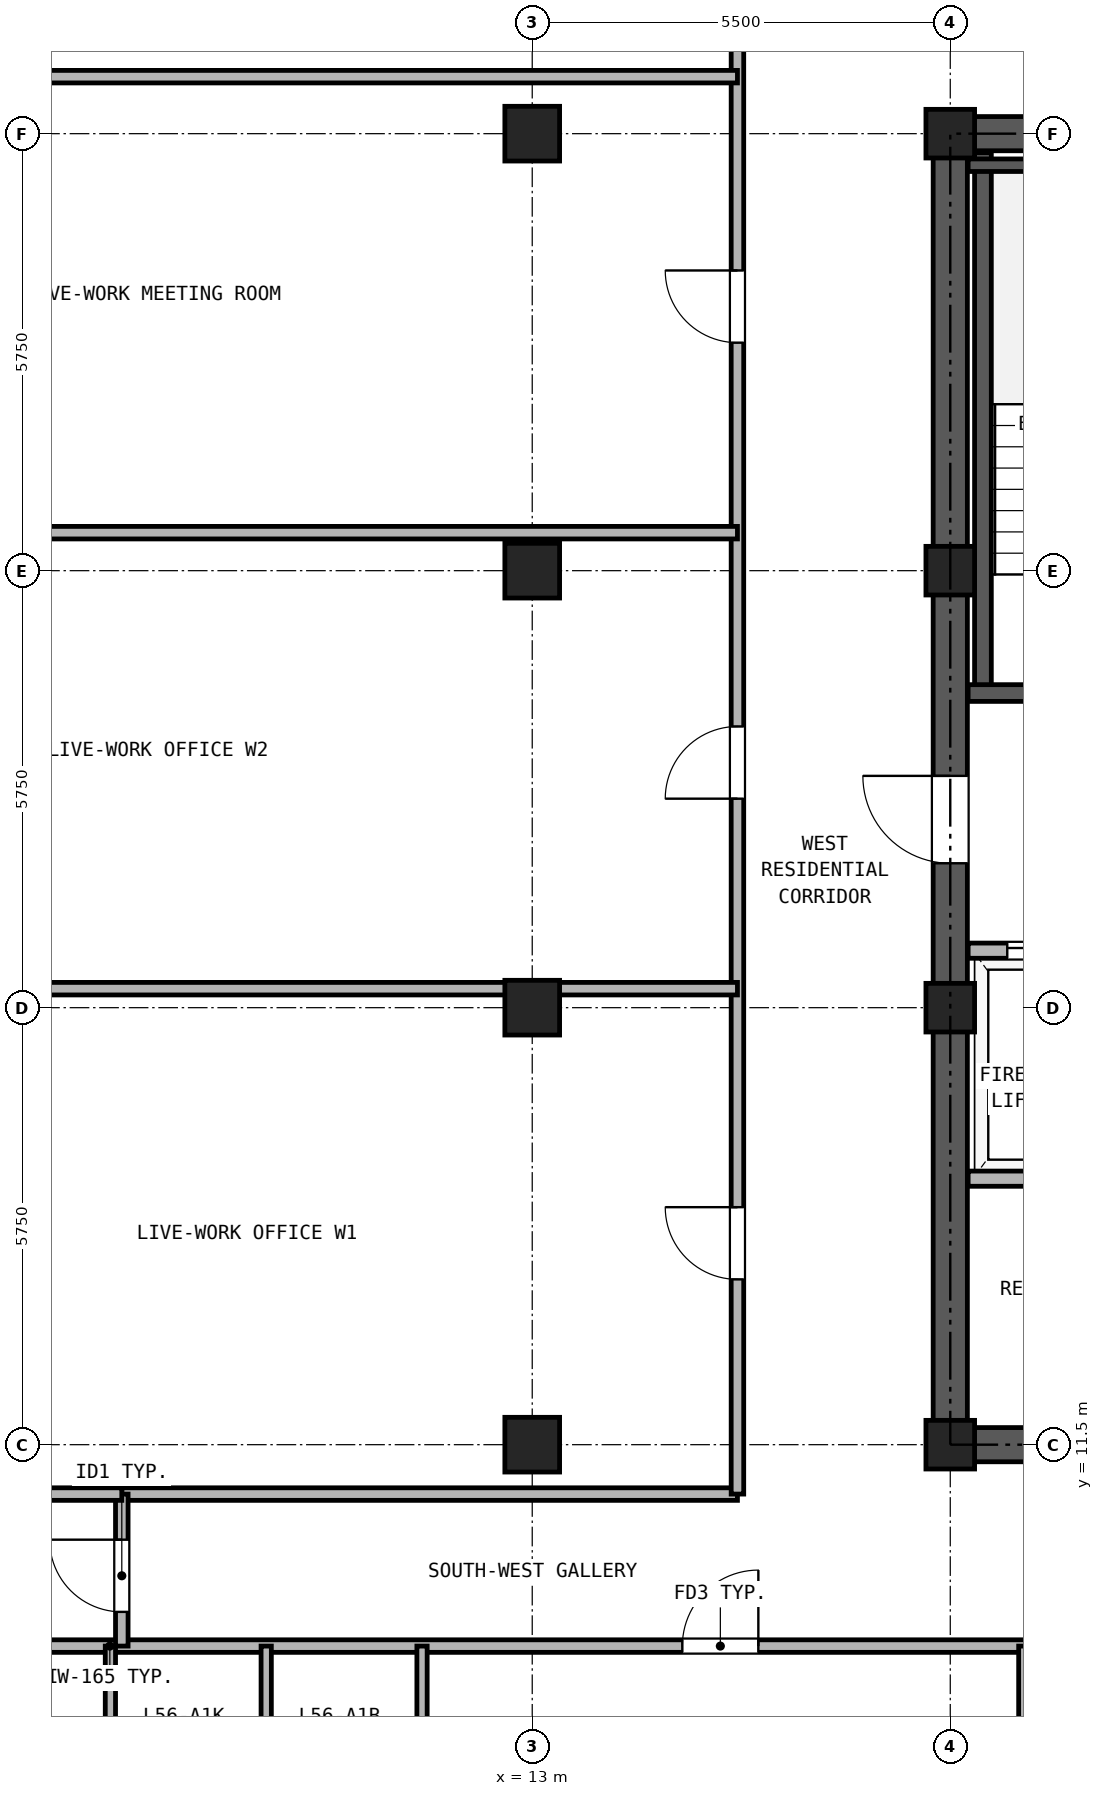
"""IFC4 building model, lengths in metres.
Left out: names, types, materials, properties, quantities, classifications, styles, units other than length and angle.
Written with IfcOpenShell. Run it as: python <this file> out.ifc"""

import sys

from ifc_helpers import new_model, si_unit, direction, frame, frame_2d, origin, origin_2d, place, context, subcontext, project, spatial, rectangle, hollow_rectangle, extrude, source, transform, mapped, element, fill, save


model = new_model("IFC4")
c1 = context("Model", 3, precision=1e-05, world=origin(), true_north=direction((0.0, 1.0)))
c2 = subcontext(c1, "Body", "Model", "MODEL_VIEW")
j1 = project(units=[si_unit("LENGTHUNIT", "METRE"), si_unit("PLANEANGLEUNIT", "RADIAN")], contexts=[c1])
p1 = place(None, origin())
s1 = spatial("IfcSite", under=j1, at=p1, CompositionType="ELEMENT")
p2 = place(p1, origin())
s2 = spatial("IfcBuilding", under=s1, at=p2, CompositionType="ELEMENT")
p3 = place(p2, frame((0.0, 0.0, 199.6)))
s3 = spatial("IfcBuildingStorey", under=s2, at=p3, CompositionType="ELEMENT", Elevation=199.6)
m1 = source(origin(), c2, "Body", "SweptSolid", [
    extrude(hollow_rectangle(XDim=0.72, YDim=0.72, WallThickness=0.04, at=origin_2d()), origin(), (0.0, 0.0, 1.0), 2.95),
])
for number, where, z_axis, x_axis in (
    (1, (13.0, 11.5, 0.0), (0.0, 0.0, 1.0), (1.0, 0.0, 0.0)),
    (2, (13.0, 17.25, 0.0), (0.0, 0.0, 1.0), (1.0, 0.0, 0.0)),
    (3, (13.0, 23.0, 0.0), (0.0, 0.0, 1.0), (1.0, 0.0, 0.0)),
    (4, (13.0, 28.75, 0.0), (0.0, 0.0, 1.0), (1.0, 0.0, 0.0)),
):
    element("IfcColumn", number, at=place(p3, frame(where, z_axis=z_axis, x_axis=x_axis)), inside=s3, PredefinedType="COLUMN", context=c2, shape_type="MappedRepresentation", body=[
        mapped(m1, transform((0.0, 0.0, 0.0), x_axis=(1.0, 0.0, 0.0), y_axis=(0.0, 1.0, 0.0), z_axis=(0.0, 0.0, 1.0), scale=1.0)),
    ])
m2 = source(origin(), c2, "Body", "SweptSolid", [
    extrude(hollow_rectangle(XDim=0.64, YDim=0.64, WallThickness=0.035, at=origin_2d()), origin(), (0.0, 0.0, 1.0), 2.95),
])
for number, where, z_axis, x_axis in (
    (5, (18.5, 11.5, 0.0), (0.0, 0.0, 1.0), (1.0, 0.0, 0.0)),
    (6, (18.5, 17.25, 0.0), (0.0, 0.0, 1.0), (1.0, 0.0, 0.0)),
    (7, (18.5, 23.0, 0.0), (0.0, 0.0, 1.0), (1.0, 0.0, 0.0)),
    (8, (18.5, 28.75, 0.0), (0.0, 0.0, 1.0), (1.0, 0.0, 0.0)),
):
    element("IfcColumn", number, at=place(p3, frame(where, z_axis=z_axis, x_axis=x_axis)), inside=s3, PredefinedType="COLUMN", context=c2, shape_type="MappedRepresentation", body=[
        mapped(m2, transform((0.0, 0.0, 0.0), x_axis=(1.0, 0.0, 0.0), y_axis=(0.0, 1.0, 0.0), z_axis=(0.0, 0.0, 1.0), scale=1.0)),
    ])
p4 = place(p3, frame((18.275, 11.5, 0.0), z_axis=(0.0, 0.0, 1.0), x_axis=(1.0, 0.0, 0.0)))
e9 = element("IfcWall", 9, at=p4, inside=s3, PredefinedType="SHEAR", context=c2, shape_type="SweptSolid", body=[
    extrude(rectangle(XDim=10.45, YDim=0.45, at=frame_2d((5.225, 0.0))), origin(), (0.0, 0.0, 1.0), 2.95),
])
p5 = place(p4, frame((1.825, 0.0, 0.0)))
e10 = element("IfcOpeningElement", 10, at=p5, cuts=e9, PredefinedType="OPENING", context=c2, shape_type="SweptSolid", body=[
    extrude(rectangle(XDim=0.95, YDim=2.15, at=frame_2d((0.475, 1.075))), frame((0.0, 0.235, 0.0), z_axis=(0.0, -1.0, 0.0), x_axis=(1.0, 0.0, 0.0)), (0.0, 0.0, 1.0), 0.47),
])
p6 = place(p4, frame((5.325, 0.0, 0.0)))
e11 = element("IfcOpeningElement", 11, at=p6, cuts=e9, PredefinedType="OPENING", context=c2, shape_type="SweptSolid", body=[
    extrude(rectangle(XDim=0.95, YDim=2.15, at=frame_2d((0.475, 1.075))), frame((0.0, 0.235, 0.0), z_axis=(0.0, -1.0, 0.0), x_axis=(1.0, 0.0, 0.0)), (0.0, 0.0, 1.0), 0.47),
])
p7 = place(p4, frame((8.225, 0.0, 0.0)))
e12 = element("IfcOpeningElement", 12, at=p7, cuts=e9, PredefinedType="OPENING", context=c2, shape_type="SweptSolid", body=[
    extrude(rectangle(XDim=1.1, YDim=2.25, at=frame_2d((0.55, 1.125))), frame((0.0, 0.235, 0.0), z_axis=(0.0, -1.0, 0.0), x_axis=(1.0, 0.0, 0.0)), (0.0, 0.0, 1.0), 0.47),
])
p8 = place(p3, frame((18.275, 28.75, 0.0), z_axis=(0.0, 0.0, 1.0), x_axis=(1.0, 0.0, 0.0)))
e13 = element("IfcWall", 13, at=p8, inside=s3, PredefinedType="SHEAR", context=c2, shape_type="SweptSolid", body=[
    extrude(rectangle(XDim=10.45, YDim=0.45, at=frame_2d((5.225, 0.0))), origin(), (0.0, 0.0, 1.0), 2.95),
])
p9 = place(p8, frame((4.105, 0.0, 0.0)))
e14 = element("IfcOpeningElement", 14, at=p9, cuts=e13, PredefinedType="OPENING", context=c2, shape_type="SweptSolid", body=[
    extrude(rectangle(XDim=0.9, YDim=2.05, at=frame_2d((0.45, 1.025))), frame((0.0, 0.235, 0.0), z_axis=(0.0, -1.0, 0.0), x_axis=(1.0, 0.0, 0.0)), (0.0, 0.0, 1.0), 0.47),
])
p10 = place(p8, frame((5.645, 0.0, 0.0)))
e15 = element("IfcOpeningElement", 15, at=p10, cuts=e13, PredefinedType="OPENING", context=c2, shape_type="SweptSolid", body=[
    extrude(rectangle(XDim=0.9, YDim=2.05, at=frame_2d((0.45, 1.025))), frame((0.0, 0.235, 0.0), z_axis=(0.0, -1.0, 0.0), x_axis=(1.0, 0.0, 0.0)), (0.0, 0.0, 1.0), 0.47),
])
p11 = place(p3, frame((18.5, 11.725, 0.0), z_axis=(0.0, 0.0, 1.0), x_axis=(0.0, 1.0, 0.0)))
e16 = element("IfcWall", 16, at=p11, inside=s3, PredefinedType="SHEAR", context=c2, shape_type="SweptSolid", body=[
    extrude(rectangle(XDim=16.8, YDim=0.45, at=frame_2d((8.4, 0.0))), origin(), (0.0, 0.0, 1.0), 2.95),
])
p12 = place(p11, frame((7.425, 0.0, 0.0)))
e17 = element("IfcOpeningElement", 17, at=p12, cuts=e16, PredefinedType="OPENING", context=c2, shape_type="SweptSolid", body=[
    extrude(rectangle(XDim=1.15, YDim=2.2, at=frame_2d((0.575, 1.1))), frame((0.0, 0.235, 0.0), z_axis=(0.0, -1.0, 0.0), x_axis=(1.0, 0.0, 0.0)), (0.0, 0.0, 1.0), 0.47),
])
p13 = place(p3, frame((18.93, 21.39, 0.0), z_axis=(0.0, 0.0, 1.0), x_axis=(0.0, 1.0, 0.0)))
e18 = element("IfcWall", 18, at=p13, inside=s3, PredefinedType="SOLIDWALL", context=c2, shape_type="SweptSolid", body=[
    extrude(rectangle(XDim=7.11, YDim=0.22, at=frame_2d((3.555, 0.0))), origin(), (0.0, 0.0, 1.0), 2.95),
])
p14 = place(p3, frame((18.735, 28.335, 0.0), z_axis=(0.0, 0.0, 1.0), x_axis=(1.0, 0.0, 0.0)))
e19 = element("IfcWall", 19, at=p14, inside=s3, PredefinedType="PARTITIONING", context=c2, shape_type="SweptSolid", body=[
    extrude(rectangle(XDim=3.375, YDim=0.165, at=frame_2d((1.688, 0.0))), origin(), (0.0, 0.0, 1.0), 2.95),
])
p15 = place(p3, frame((18.735, 21.39, 0.0), z_axis=(0.0, 0.0, 1.0), x_axis=(1.0, 0.0, 0.0)))
e20 = element("IfcWall", 20, at=p15, inside=s3, PredefinedType="SOLIDWALL", context=c2, shape_type="SweptSolid", body=[
    extrude(rectangle(XDim=6.395, YDim=0.22, at=frame_2d((3.197, 0.0))), origin(), (0.0, 0.0, 1.0), 2.95),
])
p16 = place(p15, frame((1.115, 0.0, 0.0)))
e21 = element("IfcOpeningElement", 21, at=p16, cuts=e20, PredefinedType="OPENING", context=c2, shape_type="SweptSolid", body=[
    extrude(rectangle(XDim=1.15, YDim=2.2, at=frame_2d((0.575, 1.1))), frame((0.0, 0.12, 0.0), z_axis=(0.0, -1.0, 0.0), x_axis=(1.0, 0.0, 0.0)), (0.0, 0.0, 1.0), 0.24),
])
p17 = place(p15, frame((4.845, 0.0, 0.0)))
e22 = element("IfcOpeningElement", 22, at=p17, cuts=e20, PredefinedType="OPENING", context=c2, shape_type="SweptSolid", body=[
    extrude(rectangle(XDim=1.1, YDim=2.25, at=frame_2d((0.55, 1.125))), frame((0.0, 0.12, 0.0), z_axis=(0.0, -1.0, 0.0), x_axis=(1.0, 0.0, 0.0)), (0.0, 0.0, 1.0), 0.24),
])
p18 = place(p3, frame((18.735, 18.0, 0.0), z_axis=(0.0, 0.0, 1.0), x_axis=(1.0, 0.0, 0.0)))
e23 = element("IfcWall", 23, at=p18, inside=s3, PredefinedType="PARTITIONING", context=c2, shape_type="SweptSolid", body=[
    extrude(rectangle(XDim=9.53, YDim=0.2, at=frame_2d((4.765, 0.0))), origin(), (0.0, 0.0, 1.0), 2.95),
])
p19 = place(p18, frame((0.515, 0.0, 0.0)))
e24 = element("IfcOpeningElement", 24, at=p19, cuts=e23, PredefinedType="OPENING", context=c2, shape_type="SweptSolid", body=[
    extrude(rectangle(XDim=1.3, YDim=2.3, at=frame_2d((0.65, 1.15))), frame((0.0, 0.11, 0.0), z_axis=(0.0, -1.0, 0.0), x_axis=(1.0, 0.0, 0.0)), (0.0, 0.0, 1.0), 0.22),
])
p20 = place(p18, frame((2.615, 0.0, 0.0)))
e25 = element("IfcOpeningElement", 25, at=p20, cuts=e23, PredefinedType="OPENING", context=c2, shape_type="SweptSolid", body=[
    extrude(rectangle(XDim=1.3, YDim=2.3, at=frame_2d((0.65, 1.15))), frame((0.0, 0.11, 0.0), z_axis=(0.0, -1.0, 0.0), x_axis=(1.0, 0.0, 0.0)), (0.0, 0.0, 1.0), 0.22),
])
p21 = place(p18, frame((7.115, 0.0, 0.0)))
e26 = element("IfcOpeningElement", 26, at=p21, cuts=e23, PredefinedType="OPENING", context=c2, shape_type="SweptSolid", body=[
    extrude(rectangle(XDim=1.0, YDim=2.15, at=frame_2d((0.5, 1.075))), frame((0.0, 0.11, 0.0), z_axis=(0.0, -1.0, 0.0), x_axis=(1.0, 0.0, 0.0)), (0.0, 0.0, 1.0), 0.22),
])
p22 = place(p3, frame((18.735, 15.0, 0.0), z_axis=(0.0, 0.0, 1.0), x_axis=(1.0, 0.0, 0.0)))
e27 = element("IfcWall", 27, at=p22, inside=s3, PredefinedType="PARTITIONING", context=c2, shape_type="SweptSolid", body=[
    extrude(rectangle(XDim=9.53, YDim=0.2, at=frame_2d((4.765, 0.0))), origin(), (0.0, 0.0, 1.0), 2.95),
])
p23 = place(p3, frame((0.16, 8.85, 0.0), z_axis=(0.0, 0.0, 1.0), x_axis=(1.0, 0.0, 0.0)))
e28 = element("IfcWall", 28, at=p23, inside=s3, PredefinedType="PARTITIONING", context=c2, shape_type="SweptSolid", body=[
    extrude(rectangle(XDim=41.48, YDim=0.165, at=frame_2d((20.74, 0.0))), origin(), (0.0, 0.0, 1.0), 2.95),
])
p24 = place(p23, frame((14.815, 0.0, 0.0)))
e29 = element("IfcOpeningElement", 29, at=p24, cuts=e28, PredefinedType="OPENING", context=c2, shape_type="SweptSolid", body=[
    extrude(rectangle(XDim=1.0, YDim=2.15, at=frame_2d((0.5, 1.075))), frame((0.0, 0.093, 0.0), z_axis=(0.0, -1.0, 0.0), x_axis=(1.0, 0.0, 0.0)), (0.0, 0.0, 1.0), 0.185),
])
p25 = place(p23, frame((28.315, 0.0, 0.0)))
e30 = element("IfcOpeningElement", 30, at=p25, cuts=e28, PredefinedType="OPENING", context=c2, shape_type="SweptSolid", body=[
    extrude(rectangle(XDim=1.0, YDim=2.15, at=frame_2d((0.5, 1.075))), frame((0.0, 0.093, 0.0), z_axis=(0.0, -1.0, 0.0), x_axis=(1.0, 0.0, 0.0)), (0.0, 0.0, 1.0), 0.185),
])
p26 = place(p23, frame((32.615, 0.0, 0.0)))
e31 = element("IfcOpeningElement", 31, at=p26, cuts=e28, PredefinedType="OPENING", context=c2, shape_type="SweptSolid", body=[
    extrude(rectangle(XDim=1.0, YDim=2.15, at=frame_2d((0.5, 1.075))), frame((0.0, 0.093, 0.0), z_axis=(0.0, -1.0, 0.0), x_axis=(1.0, 0.0, 0.0)), (0.0, 0.0, 1.0), 0.185),
])
p27 = place(p3, frame((7.6, 10.85, 0.0), z_axis=(0.0, 0.0, 1.0), x_axis=(1.0, 0.0, 0.0)))
e32 = element("IfcWall", 32, at=p27, inside=s3, PredefinedType="PARTITIONING", context=c2, shape_type="SweptSolid", body=[
    extrude(rectangle(XDim=8.1, YDim=0.165, at=frame_2d((4.05, 0.0))), origin(), (0.0, 0.0, 1.0), 2.95),
])
p28 = place(p3, frame((7.6, 8.85, 0.0), z_axis=(0.0, 0.0, 1.0), x_axis=(0.0, 1.0, 0.0)))
e33 = element("IfcWall", 33, at=p28, inside=s3, PredefinedType="PARTITIONING", context=c2, shape_type="SweptSolid", body=[
    extrude(rectangle(XDim=2.0, YDim=0.165, at=frame_2d((1.0, 0.0))), origin(), (0.0, 0.0, 1.0), 2.95),
])
p29 = place(p28, frame((0.45, 0.0, 0.0)))
e34 = element("IfcOpeningElement", 34, at=p29, cuts=e33, PredefinedType="OPENING", context=c2, shape_type="SweptSolid", body=[
    extrude(rectangle(XDim=0.95, YDim=2.15, at=frame_2d((0.475, 1.075))), frame((0.0, 0.093, 0.0), z_axis=(0.0, -1.0, 0.0), x_axis=(1.0, 0.0, 0.0)), (0.0, 0.0, 1.0), 0.185),
])
p30 = place(p3, frame((15.7, 10.85, 0.0), z_axis=(0.0, 0.0, 1.0), x_axis=(0.0, 1.0, 0.0)))
e35 = element("IfcWall", 35, at=p30, inside=s3, PredefinedType="PARTITIONING", context=c2, shape_type="SweptSolid", body=[
    extrude(rectangle(XDim=24.29, YDim=0.165, at=frame_2d((12.145, 0.0))), origin(), (0.0, 0.0, 1.0), 2.95),
])
p31 = place(p30, frame((2.825, 0.0, 0.0)))
e36 = element("IfcOpeningElement", 36, at=p31, cuts=e35, PredefinedType="OPENING", context=c2, shape_type="SweptSolid", body=[
    extrude(rectangle(XDim=0.95, YDim=2.15, at=frame_2d((0.475, 1.075))), frame((0.0, 0.093, 0.0), z_axis=(0.0, -1.0, 0.0), x_axis=(1.0, 0.0, 0.0)), (0.0, 0.0, 1.0), 0.185),
])
p32 = place(p30, frame((9.15, 0.0, 0.0)))
e37 = element("IfcOpeningElement", 37, at=p32, cuts=e35, PredefinedType="OPENING", context=c2, shape_type="SweptSolid", body=[
    extrude(rectangle(XDim=0.95, YDim=2.15, at=frame_2d((0.475, 1.075))), frame((0.0, 0.093, 0.0), z_axis=(0.0, -1.0, 0.0), x_axis=(1.0, 0.0, 0.0)), (0.0, 0.0, 1.0), 0.185),
])
p33 = place(p30, frame((15.15, 0.0, 0.0)))
e38 = element("IfcOpeningElement", 38, at=p33, cuts=e35, PredefinedType="OPENING", context=c2, shape_type="SweptSolid", body=[
    extrude(rectangle(XDim=0.95, YDim=2.15, at=frame_2d((0.475, 1.075))), frame((0.0, 0.093, 0.0), z_axis=(0.0, -1.0, 0.0), x_axis=(1.0, 0.0, 0.0)), (0.0, 0.0, 1.0), 0.185),
])
p34 = place(p30, frame((20.97, 0.0, 0.0)))
e39 = element("IfcOpeningElement", 39, at=p34, cuts=e35, PredefinedType="OPENING", context=c2, shape_type="SweptSolid", body=[
    extrude(rectangle(XDim=0.95, YDim=2.15, at=frame_2d((0.475, 1.075))), frame((0.0, 0.093, 0.0), z_axis=(0.0, -1.0, 0.0), x_axis=(1.0, 0.0, 0.0)), (0.0, 0.0, 1.0), 0.185),
])
for number, where, z_axis, x_axis in (
    (40, (7.45, 6.7, 0.0), (0.0, 0.0, 1.0), (0.0, 1.0, 0.0)),
    (41, (9.5, 6.7, 0.0), (0.0, 0.0, 1.0), (0.0, 1.0, 0.0)),
    (42, (11.55, 6.7, 0.0), (0.0, 0.0, 1.0), (0.0, 1.0, 0.0)),
):
    element("IfcWall", number, at=place(p3, frame(where, z_axis=z_axis, x_axis=x_axis)), inside=s3, PredefinedType="PARTITIONING", context=c2, shape_type="SweptSolid", body=[
        extrude(rectangle(XDim=2.15, YDim=0.135, at=frame_2d((1.075, 0.0))), origin(), (0.0, 0.0, 1.0), 2.95),
    ])
p35 = place(p3, frame((19.5, 0.16, 0.0), z_axis=(0.0, 0.0, 1.0), x_axis=(0.0, 1.0, 0.0)))
e43 = element("IfcWall", 43, at=p35, inside=s3, PredefinedType="PARTITIONING", context=c2, shape_type="SweptSolid", body=[
    extrude(rectangle(XDim=8.69, YDim=0.2, at=frame_2d((4.345, 0.0))), origin(), (0.0, 0.0, 1.0), 2.95),
])
p36 = place(p3, frame((0.16, 10.85, 0.0), z_axis=(0.0, 0.0, 1.0), x_axis=(1.0, 0.0, 0.0)))
e44 = element("IfcWall", 44, at=p36, inside=s3, PredefinedType="PARTITIONING", context=c2, shape_type="SweptSolid", body=[
    extrude(rectangle(XDim=7.44, YDim=0.165, at=frame_2d((3.72, 0.0))), origin(), (0.0, 0.0, 1.0), 2.95),
])
p37 = place(p3, frame((0.16, 17.5, 0.0), z_axis=(0.0, 0.0, 1.0), x_axis=(1.0, 0.0, 0.0)))
e45 = element("IfcWall", 45, at=p37, inside=s3, PredefinedType="PARTITIONING", context=c2, shape_type="SweptSolid", body=[
    extrude(rectangle(XDim=15.54, YDim=0.165, at=frame_2d((7.77, 0.0))), origin(), (0.0, 0.0, 1.0), 2.323),
])
for number, where, z_axis, x_axis in (
    (46, (0.16, 23.5, 0.0), (0.0, 0.0, 1.0), (1.0, 0.0, 0.0)),
    (47, (0.16, 29.5, 0.0), (0.0, 0.0, 1.0), (1.0, 0.0, 0.0)),
):
    element("IfcWall", number, at=place(p3, frame(where, z_axis=z_axis, x_axis=x_axis)), inside=s3, PredefinedType="PARTITIONING", context=c2, shape_type="SweptSolid", body=[
        extrude(rectangle(XDim=15.54, YDim=0.165, at=frame_2d((7.77, 0.0))), origin(), (0.0, 0.0, 1.0), 2.95),
    ])
p38 = place(p19, origin())
e48 = element("IfcDoor", 48, at=p38, inside=s3, OperationType="DOUBLE_DOOR_SLIDING", PredefinedType="DOOR", context=c2, shape_type="SweptSolid", body=[
    extrude(rectangle(XDim=1.3, YDim=2.3, at=frame_2d((0.65, 1.15))), frame((0.0, 0.025, 0.0), z_axis=(0.0, -1.0, 0.0), x_axis=(1.0, 0.0, 0.0)), (0.0, 0.0, 1.0), 0.05),
])
fill(e24, e48)
p39 = place(p12, frame((1.15, 0.0, 0.0), z_axis=(0.0, 0.0, 1.0), x_axis=(-1.0, 0.0, 0.0)))
e49 = element("IfcDoor", 49, at=p39, inside=s3, OperationType="SINGLE_SWING_RIGHT", PredefinedType="DOOR", context=c2, shape_type="SweptSolid", body=[
    extrude(rectangle(XDim=1.15, YDim=2.2, at=frame_2d((0.575, 1.1))), frame((0.0, 0.025, 0.0), z_axis=(0.0, -1.0, 0.0), x_axis=(1.0, 0.0, 0.0)), (0.0, 0.0, 1.0), 0.05),
])
fill(e17, e49)
p40 = place(p24, frame((1.0, 0.0, 0.0), z_axis=(0.0, 0.0, 1.0), x_axis=(-1.0, 0.0, 0.0)))
e50 = element("IfcDoor", 50, at=p40, inside=s3, OperationType="SINGLE_SWING_RIGHT", PredefinedType="DOOR", context=c2, shape_type="SweptSolid", body=[
    extrude(rectangle(XDim=1.0, YDim=2.15, at=frame_2d((0.5, 1.075))), frame((0.0, 0.025, 0.0), z_axis=(0.0, -1.0, 0.0), x_axis=(1.0, 0.0, 0.0)), (0.0, 0.0, 1.0), 0.05),
])
fill(e29, e50)
p41 = place(p29, frame((0.95, 0.0, 0.0), z_axis=(0.0, 0.0, 1.0), x_axis=(-1.0, 0.0, 0.0)))
e51 = element("IfcDoor", 51, at=p41, inside=s3, OperationType="SINGLE_SWING_RIGHT", PredefinedType="DOOR", context=c2, shape_type="SweptSolid", body=[
    extrude(rectangle(XDim=0.95, YDim=2.15, at=frame_2d((0.475, 1.075))), frame((0.0, 0.025, 0.0), z_axis=(0.0, -1.0, 0.0), x_axis=(1.0, 0.0, 0.0)), (0.0, 0.0, 1.0), 0.05),
])
fill(e34, e51)
p42 = place(p31, frame((0.95, 0.0, 0.0), z_axis=(0.0, 0.0, 1.0), x_axis=(-1.0, 0.0, 0.0)))
e52 = element("IfcDoor", 52, at=p42, inside=s3, OperationType="SINGLE_SWING_RIGHT", PredefinedType="DOOR", context=c2, shape_type="SweptSolid", body=[
    extrude(rectangle(XDim=0.95, YDim=2.15, at=frame_2d((0.475, 1.075))), frame((0.0, 0.025, 0.0), z_axis=(0.0, -1.0, 0.0), x_axis=(1.0, 0.0, 0.0)), (0.0, 0.0, 1.0), 0.05),
])
fill(e36, e52)
p43 = place(p32, frame((0.95, 0.0, 0.0), z_axis=(0.0, 0.0, 1.0), x_axis=(-1.0, 0.0, 0.0)))
e53 = element("IfcDoor", 53, at=p43, inside=s3, OperationType="SINGLE_SWING_LEFT", PredefinedType="DOOR", context=c2, shape_type="SweptSolid", body=[
    extrude(rectangle(XDim=0.95, YDim=2.15, at=frame_2d((0.475, 1.075))), frame((0.0, 0.025, 0.0), z_axis=(0.0, -1.0, 0.0), x_axis=(1.0, 0.0, 0.0)), (0.0, 0.0, 1.0), 0.05),
])
fill(e37, e53)
p44 = place(p33, frame((0.95, 0.0, 0.0), z_axis=(0.0, 0.0, 1.0), x_axis=(-1.0, 0.0, 0.0)))
e54 = element("IfcDoor", 54, at=p44, inside=s3, OperationType="SINGLE_SWING_RIGHT", PredefinedType="DOOR", context=c2, shape_type="SweptSolid", body=[
    extrude(rectangle(XDim=0.95, YDim=2.15, at=frame_2d((0.475, 1.075))), frame((0.0, 0.025, 0.0), z_axis=(0.0, -1.0, 0.0), x_axis=(1.0, 0.0, 0.0)), (0.0, 0.0, 1.0), 0.05),
])
fill(e38, e54)
save(model, sys.argv[1])
